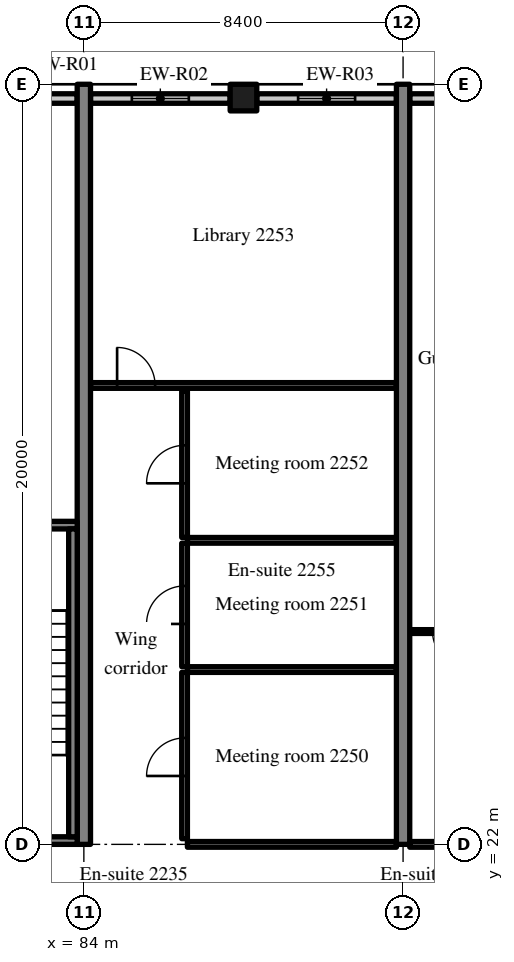
"""IFC4 building model, lengths in metres.
Left out: names, types, materials, properties, quantities, classifications, styles, units other than length and angle.
Written with IfcOpenShell. Run it as: python <this file> out.ifc"""

import sys

from ifc_helpers import new_model, si_unit, direction, frame, frame_2d, origin, origin_2d, place, context, subcontext, project, spatial, rectangle, extrude, source, transform, mapped, element, fill, save


model = new_model("IFC4")
c1 = context("Model", 3, precision=1e-05, world=origin(), true_north=direction((0.0, 1.0)))
c2 = subcontext(c1, "Body", "Model", "MODEL_VIEW")
j1 = project(units=[si_unit("LENGTHUNIT", "METRE"), si_unit("PLANEANGLEUNIT", "RADIAN")], contexts=[c1])
p1 = place(None, origin())
s1 = spatial("IfcSite", under=j1, at=p1, CompositionType="ELEMENT")
p2 = place(p1, origin())
s2 = spatial("IfcBuilding", under=s1, at=p2, CompositionType="ELEMENT")
p3 = place(p2, frame((0.0, 0.0, 95.2)))
s3 = spatial("IfcBuildingStorey", under=s2, at=p3, CompositionType="ELEMENT", Elevation=95.2)
m1 = source(origin(), c2, "Body", "SweptSolid", [
    extrude(rectangle(XDim=20.0, YDim=0.35, at=frame_2d((10.0, 0.0))), origin(), (0.0, 0.0, 1.0), 3.52),
])
for number, where, z_axis, x_axis in (
    (1, (84.0, 22.0, 0.0), (0.0, 0.0, 1.0), (0.0, 1.0, 0.0)),
    (2, (92.4, 22.0, 0.0), (0.0, 0.0, 1.0), (0.0, 1.0, 0.0)),
):
    element("IfcWall", number, at=place(p3, frame(where, z_axis=z_axis, x_axis=x_axis)), inside=s3, PredefinedType="SHEAR", context=c2, shape_type="MappedRepresentation", body=[
        mapped(m1, transform((0.0, 0.0, 0.0), scale=1.0)),
    ])
m2 = source(origin(), c2, "Body", "SweptSolid", [
    extrude(rectangle(XDim=0.7, YDim=0.7, at=origin_2d()), origin(), (0.0, 0.0, 1.0), 3.52),
])
p4 = place(p3, frame((88.2, 41.65, 0.0), z_axis=(0.0, 0.0, 1.0), x_axis=(1.0, 0.0, 0.0)))
e3 = element("IfcColumn", 3, at=p4, inside=s3, PredefinedType="COLUMN", context=c2, shape_type="MappedRepresentation", body=[
    mapped(m2, transform((0.0, 0.0, 0.0), scale=1.0)),
])
m3 = source(origin(), c2, "Body", "SweptSolid", [
    extrude(rectangle(XDim=1.683, YDim=0.25, at=frame_2d((0.841, 0.0))), origin(), (0.0, 0.0, 1.0), 2.82),
])
p5 = place(p3, frame((83.825, 41.625, 0.0), z_axis=(0.0, 0.0, 1.0), x_axis=(-1.0, 0.0, 0.0)))
e4 = element("IfcWall", 4, at=p5, inside=s3, PredefinedType="SOLIDWALL", context=c2, shape_type="MappedRepresentation", body=[
    mapped(m3, transform((0.0, 0.0, 0.0), scale=1.0)),
])
m4 = source(origin(), c2, "Body", "SweptSolid", [
    extrude(rectangle(XDim=3.675, YDim=0.25, at=frame_2d((1.837, 0.0))), origin(), (0.0, 0.0, 1.0), 2.82),
])
p6 = place(p3, frame((87.85, 41.625, 0.0), z_axis=(0.0, 0.0, 1.0), x_axis=(-1.0, 0.0, 0.0)))
e5 = element("IfcWall", 5, at=p6, inside=s3, PredefinedType="SOLIDWALL", context=c2, shape_type="MappedRepresentation", body=[
    mapped(m4, transform((0.0, 0.0, 0.0), scale=1.0)),
])
m5 = source(origin(), c2, "Body", "SweptSolid", [
    extrude(rectangle(XDim=1.5, YDim=1.5, at=frame_2d((0.75, 0.75))), frame((0.0, 0.135, 0.0), z_axis=(0.0, -1.0, 0.0), x_axis=(1.0, 0.0, 0.0)), (0.0, 0.0, 1.0), 0.27),
])
p7 = place(p6, frame((1.087, 0.0, 0.9)))
e6 = element("IfcOpeningElement", 6, at=p7, cuts=e5, PredefinedType="OPENING", context=c2, shape_type="MappedRepresentation", body=[
    mapped(m5, transform((0.0, 0.0, 0.0), scale=1.0)),
])
p8 = place(p3, frame((92.225, 41.625, 0.0), z_axis=(0.0, 0.0, 1.0), x_axis=(-1.0, 0.0, 0.0)))
e7 = element("IfcWall", 7, at=p8, inside=s3, PredefinedType="SOLIDWALL", context=c2, shape_type="MappedRepresentation", body=[
    mapped(m4, transform((0.0, 0.0, 0.0), scale=1.0)),
])
p9 = place(p8, frame((1.087, 0.0, 0.9)))
e8 = element("IfcOpeningElement", 8, at=p9, cuts=e7, PredefinedType="OPENING", context=c2, shape_type="MappedRepresentation", body=[
    mapped(m5, transform((0.0, 0.0, 0.0), scale=1.0)),
])
m6 = source(origin(), c2, "Body", "SweptSolid", [
    extrude(rectangle(XDim=4.07, YDim=0.25, at=frame_2d((2.035, 0.0))), origin(), (0.0, 0.0, 1.0), 2.82),
])
p10 = place(p3, frame((96.645, 41.625, 0.0), z_axis=(0.0, 0.0, 1.0), x_axis=(-1.0, 0.0, 0.0)))
e9 = element("IfcWall", 9, at=p10, inside=s3, PredefinedType="SOLIDWALL", context=c2, shape_type="MappedRepresentation", body=[
    mapped(m6, transform((0.0, 0.0, 0.0), scale=1.0)),
])
p11 = place(p10, frame((1.285, 0.0, 0.9)))
e10 = element("IfcOpeningElement", 10, at=p11, cuts=e9, PredefinedType="OPENING", context=c2, shape_type="MappedRepresentation", body=[
    mapped(m5, transform((0.0, 0.0, 0.0), scale=1.0)),
])
m7 = source(origin(), c2, "Body", "SweptSolid", [
    extrude(rectangle(XDim=8.225, YDim=0.2, at=frame_2d((4.112, 0.0))), origin(), (0.0, 0.0, 1.0), 3.52),
])
p12 = place(p3, frame((83.825, 22.1, 0.0), z_axis=(0.0, 0.0, 1.0), x_axis=(-1.0, 0.0, 0.0)))
e11 = element("IfcWall", 11, at=p12, inside=s3, PredefinedType="SOLIDWALL", context=c2, shape_type="MappedRepresentation", body=[
    mapped(m7, transform((0.0, 0.0, 0.0), scale=1.0)),
])
m8 = source(origin(), c2, "Body", "SweptSolid", [
    extrude(rectangle(XDim=1.2, YDim=2.1, at=frame_2d((0.6, 1.05))), frame((0.0, 0.11, 0.0), z_axis=(0.0, -1.0, 0.0), x_axis=(1.0, 0.0, 0.0)), (0.0, 0.0, 1.0), 0.22),
])
p13 = place(p12, frame((6.025, 0.0, 0.0)))
e12 = element("IfcOpeningElement", 12, at=p13, cuts=e11, PredefinedType="OPENING", context=c2, shape_type="MappedRepresentation", body=[
    mapped(m8, transform((0.0, 0.0, 0.0), scale=1.0)),
])
p14 = place(p3, frame((83.825, 30.4, 0.0), z_axis=(0.0, 0.0, 1.0), x_axis=(-1.0, 0.0, 0.0)))
e13 = element("IfcWall", 13, at=p14, inside=s3, PredefinedType="SOLIDWALL", context=c2, shape_type="MappedRepresentation", body=[
    mapped(m7, transform((0.0, 0.0, 0.0), scale=1.0)),
])
m9 = source(origin(), c2, "Body", "SweptSolid", [
    extrude(rectangle(XDim=1.0, YDim=2.1, at=frame_2d((0.5, 1.05))), frame((0.0, 0.11, 0.0), z_axis=(0.0, -1.0, 0.0), x_axis=(1.0, 0.0, 0.0)), (0.0, 0.0, 1.0), 0.22),
])
p15 = place(p14, frame((6.125, 0.0, 0.0)))
e14 = element("IfcOpeningElement", 14, at=p15, cuts=e13, PredefinedType="OPENING", context=c2, shape_type="MappedRepresentation", body=[
    mapped(m9, transform((0.0, 0.0, 0.0), scale=1.0)),
])
m10 = source(origin(), c2, "Body", "SweptSolid", [
    extrude(rectangle(XDim=8.1, YDim=0.225, at=frame_2d((4.05, 0.0))), origin(), (0.0, 0.0, 1.0), 3.52),
])
p16 = place(p3, frame((83.713, 22.2, 0.0), z_axis=(0.0, 0.0, 1.0), x_axis=(0.0, 1.0, 0.0)))
e15 = element("IfcWall", 15, at=p16, inside=s3, PredefinedType="SOLIDWALL", context=c2, shape_type="MappedRepresentation", body=[
    mapped(m10, transform((0.0, 0.0, 0.0), scale=1.0)),
])
m11 = source(origin(), c2, "Body", "SweptSolid", [
    extrude(rectangle(XDim=5.5, YDim=0.15, at=frame_2d((2.75, 0.0))), origin(), (0.0, 0.0, 1.0), 2.82),
])
p17 = place(p3, frame((86.725, 22.0, 0.0), z_axis=(0.0, 0.0, 1.0), x_axis=(1.0, 0.0, 0.0)))
e16 = element("IfcWall", 16, at=p17, inside=s3, PredefinedType="PARTITIONING", context=c2, shape_type="MappedRepresentation", body=[
    mapped(m11, transform((0.0, 0.0, 0.0), scale=1.0)),
])
m12 = source(origin(), c2, "Body", "SweptSolid", [
    extrude(rectangle(XDim=4.375, YDim=0.15, at=frame_2d((2.188, 0.0))), origin(), (0.0, 0.0, 1.0), 3.52),
])
p18 = place(p3, frame((86.65, 22.15, 0.0), z_axis=(0.0, 0.0, 1.0), x_axis=(0.0, 1.0, 0.0)))
e17 = element("IfcWall", 17, at=p18, inside=s3, PredefinedType="PARTITIONING", context=c2, shape_type="MappedRepresentation", body=[
    mapped(m12, transform((0.0, 0.0, 0.0), scale=1.0)),
])
m13 = source(origin(), c2, "Body", "SweptSolid", [
    extrude(rectangle(XDim=1.0, YDim=2.1, at=frame_2d((0.5, 1.05))), frame((0.0, 0.085, 0.0), z_axis=(0.0, -1.0, 0.0), x_axis=(1.0, 0.0, 0.0)), (0.0, 0.0, 1.0), 0.17),
])
p19 = place(p18, frame((1.65, 0.0, 0.0)))
e18 = element("IfcOpeningElement", 18, at=p19, cuts=e17, PredefinedType="OPENING", context=c2, shape_type="MappedRepresentation", body=[
    mapped(m13, transform((0.0, 0.0, 0.0), scale=1.0)),
])
m14 = source(origin(), c2, "Body", "SweptSolid", [
    extrude(rectangle(XDim=5.5, YDim=0.15, at=frame_2d((2.75, 0.0))), origin(), (0.0, 0.0, 1.0), 3.52),
])
p20 = place(p3, frame((86.725, 26.6, 0.0), z_axis=(0.0, 0.0, 1.0), x_axis=(1.0, 0.0, 0.0)))
e19 = element("IfcWall", 19, at=p20, inside=s3, PredefinedType="PARTITIONING", context=c2, shape_type="MappedRepresentation", body=[
    mapped(m14, transform((0.0, 0.0, 0.0), scale=1.0)),
])
m15 = source(origin(), c2, "Body", "SweptSolid", [
    extrude(rectangle(XDim=3.25, YDim=0.15, at=frame_2d((1.625, 0.0))), origin(), (0.0, 0.0, 1.0), 3.52),
])
p21 = place(p3, frame((86.65, 26.675, 0.0), z_axis=(0.0, 0.0, 1.0), x_axis=(0.0, 1.0, 0.0)))
e20 = element("IfcWall", 20, at=p21, inside=s3, PredefinedType="PARTITIONING", context=c2, shape_type="MappedRepresentation", body=[
    mapped(m15, transform((0.0, 0.0, 0.0), scale=1.0)),
])
p22 = place(p21, frame((1.125, 0.0, 0.0)))
e21 = element("IfcOpeningElement", 21, at=p22, cuts=e20, PredefinedType="OPENING", context=c2, shape_type="MappedRepresentation", body=[
    mapped(m13, transform((0.0, 0.0, 0.0), scale=1.0)),
])
p23 = place(p3, frame((86.725, 30.0, 0.0), z_axis=(0.0, 0.0, 1.0), x_axis=(1.0, 0.0, 0.0)))
e22 = element("IfcWall", 22, at=p23, inside=s3, PredefinedType="PARTITIONING", context=c2, shape_type="MappedRepresentation", body=[
    mapped(m14, transform((0.0, 0.0, 0.0), scale=1.0)),
])
m16 = source(origin(), c2, "Body", "SweptSolid", [
    extrude(rectangle(XDim=3.85, YDim=0.15, at=frame_2d((1.925, 0.0))), origin(), (0.0, 0.0, 1.0), 3.52),
])
p24 = place(p3, frame((86.65, 30.075, 0.0), z_axis=(0.0, 0.0, 1.0), x_axis=(0.0, 1.0, 0.0)))
e23 = element("IfcWall", 23, at=p24, inside=s3, PredefinedType="PARTITIONING", context=c2, shape_type="MappedRepresentation", body=[
    mapped(m16, transform((0.0, 0.0, 0.0), scale=1.0)),
])
p25 = place(p24, frame((1.425, 0.0, 0.0)))
e24 = element("IfcOpeningElement", 24, at=p25, cuts=e23, PredefinedType="OPENING", context=c2, shape_type="MappedRepresentation", body=[
    mapped(m13, transform((0.0, 0.0, 0.0), scale=1.0)),
])
m17 = source(origin(), c2, "Body", "SweptSolid", [
    extrude(rectangle(XDim=8.05, YDim=0.15, at=frame_2d((4.025, 0.0))), origin(), (0.0, 0.0, 1.0), 3.52),
])
p26 = place(p3, frame((84.175, 34.075, 0.0), z_axis=(0.0, 0.0, 1.0), x_axis=(1.0, 0.0, 0.0)))
e25 = element("IfcWall", 25, at=p26, inside=s3, PredefinedType="PARTITIONING", context=c2, shape_type="MappedRepresentation", body=[
    mapped(m17, transform((0.0, 0.0, 0.0), scale=1.0)),
])
p27 = place(p26, frame((0.7, 0.0, 0.0)))
e26 = element("IfcOpeningElement", 26, at=p27, cuts=e25, PredefinedType="OPENING", context=c2, shape_type="MappedRepresentation", body=[
    mapped(m13, transform((0.0, 0.0, 0.0), scale=1.0)),
])
m18 = source(origin(), c2, "Body", "SweptSolid", [
    extrude(rectangle(XDim=2.1, YDim=0.1, at=frame_2d((1.05, 0.0))), origin(), (0.0, 0.0, 1.0), 3.52),
])
p28 = place(p3, frame((92.575, 27.6, 0.0), z_axis=(0.0, 0.0, 1.0), x_axis=(1.0, 0.0, 0.0)))
e27 = element("IfcWall", 27, at=p28, inside=s3, PredefinedType="PARTITIONING", context=c2, shape_type="MappedRepresentation", body=[
    mapped(m18, transform((0.0, 0.0, 0.0), scale=1.0)),
])
m19 = source(origin(), c2, "Body", "SweptSolid", [
    extrude(rectangle(XDim=0.9, YDim=2.1, at=frame_2d((0.45, 1.05))), frame((0.0, 0.06, 0.0), z_axis=(0.0, -1.0, 0.0), x_axis=(1.0, 0.0, 0.0)), (0.0, 0.0, 1.0), 0.12),
])
p29 = place(p28, frame((0.6, 0.0, 0.0)))
e28 = element("IfcOpeningElement", 28, at=p29, cuts=e27, PredefinedType="OPENING", context=c2, shape_type="MappedRepresentation", body=[
    mapped(m19, transform((0.0, 0.0, 0.0), scale=1.0)),
])
m20 = source(origin(), c2, "Body", "SweptSolid", [
    extrude(rectangle(XDim=3.95, YDim=0.15, at=frame_2d((1.975, 0.0))), origin(), (0.0, 0.0, 1.0), 2.82),
])
p30 = place(p3, frame((92.575, 22.0, 0.0), z_axis=(0.0, 0.0, 1.0), x_axis=(1.0, 0.0, 0.0)))
e29 = element("IfcWall", 29, at=p30, inside=s3, PredefinedType="PARTITIONING", context=c2, shape_type="MappedRepresentation", body=[
    mapped(m20, transform((0.0, 0.0, 0.0), scale=1.0)),
])
p31 = place(p30, frame((2.55, 0.0, 0.0)))
e30 = element("IfcOpeningElement", 30, at=p31, cuts=e29, PredefinedType="OPENING", context=c2, shape_type="MappedRepresentation", body=[
    mapped(m13, transform((0.0, 0.0, 0.0), scale=1.0)),
])
m21 = source(origin(), c2, "Body", "SweptSolid", [
    extrude(rectangle(XDim=1.5, YDim=1.5, at=frame_2d((0.75, 0.75))), frame((0.0, 0.03, 0.0), z_axis=(0.0, -1.0, 0.0), x_axis=(1.0, 0.0, 0.0)), (0.0, 0.0, 1.0), 0.06),
])
p32 = place(p7, origin())
e31 = element("IfcWindow", 31, at=p32, inside=s3, PartitioningType="SINGLE_PANEL", PredefinedType="WINDOW", context=c2, shape_type="MappedRepresentation", body=[
    mapped(m21, transform((0.0, 0.0, 0.0), scale=1.0)),
])
fill(e6, e31)
p33 = place(p9, origin())
e32 = element("IfcWindow", 32, at=p33, inside=s3, PartitioningType="SINGLE_PANEL", PredefinedType="WINDOW", context=c2, shape_type="MappedRepresentation", body=[
    mapped(m21, transform((0.0, 0.0, 0.0), scale=1.0)),
])
fill(e8, e32)
m22 = source(origin(), c2, "Body", "SweptSolid", [
    extrude(rectangle(XDim=1.0, YDim=2.1, at=frame_2d((0.5, 1.05))), frame((0.0, 0.025, 0.0), z_axis=(0.0, -1.0, 0.0), x_axis=(1.0, 0.0, 0.0)), (0.0, 0.0, 1.0), 0.05),
])
p34 = place(p19, origin())
e33 = element("IfcDoor", 33, at=p34, inside=s3, OperationType="SINGLE_SWING_LEFT", PredefinedType="DOOR", context=c2, shape_type="MappedRepresentation", body=[
    mapped(m22, transform((0.0, 0.0, 0.0), scale=1.0)),
])
fill(e18, e33)
p35 = place(p22, origin())
e34 = element("IfcDoor", 34, at=p35, inside=s3, OperationType="SINGLE_SWING_LEFT", PredefinedType="DOOR", context=c2, shape_type="MappedRepresentation", body=[
    mapped(m22, transform((0.0, 0.0, 0.0), scale=1.0)),
])
fill(e21, e34)
p36 = place(p25, origin())
e35 = element("IfcDoor", 35, at=p36, inside=s3, OperationType="SINGLE_SWING_LEFT", PredefinedType="DOOR", context=c2, shape_type="MappedRepresentation", body=[
    mapped(m22, transform((0.0, 0.0, 0.0), scale=1.0)),
])
fill(e24, e35)
p37 = place(p27, origin())
e36 = element("IfcDoor", 36, at=p37, inside=s3, OperationType="SINGLE_SWING_LEFT", PredefinedType="DOOR", context=c2, shape_type="MappedRepresentation", body=[
    mapped(m22, transform((0.0, 0.0, 0.0), scale=1.0)),
])
fill(e26, e36)
m23 = source(origin(), c2, "Body", "SweptSolid", [
    extrude(rectangle(XDim=0.9, YDim=2.1, at=frame_2d((0.45, 1.05))), frame((0.0, 0.025, 0.0), z_axis=(0.0, -1.0, 0.0), x_axis=(1.0, 0.0, 0.0)), (0.0, 0.0, 1.0), 0.05),
])
p38 = place(p29, origin())
e37 = element("IfcDoor", 37, at=p38, inside=s3, OperationType="SINGLE_SWING_RIGHT", PredefinedType="DOOR", context=c2, shape_type="MappedRepresentation", body=[
    mapped(m23, transform((0.0, 0.0, 0.0), scale=1.0)),
])
fill(e28, e37)
save(model, sys.argv[1])
